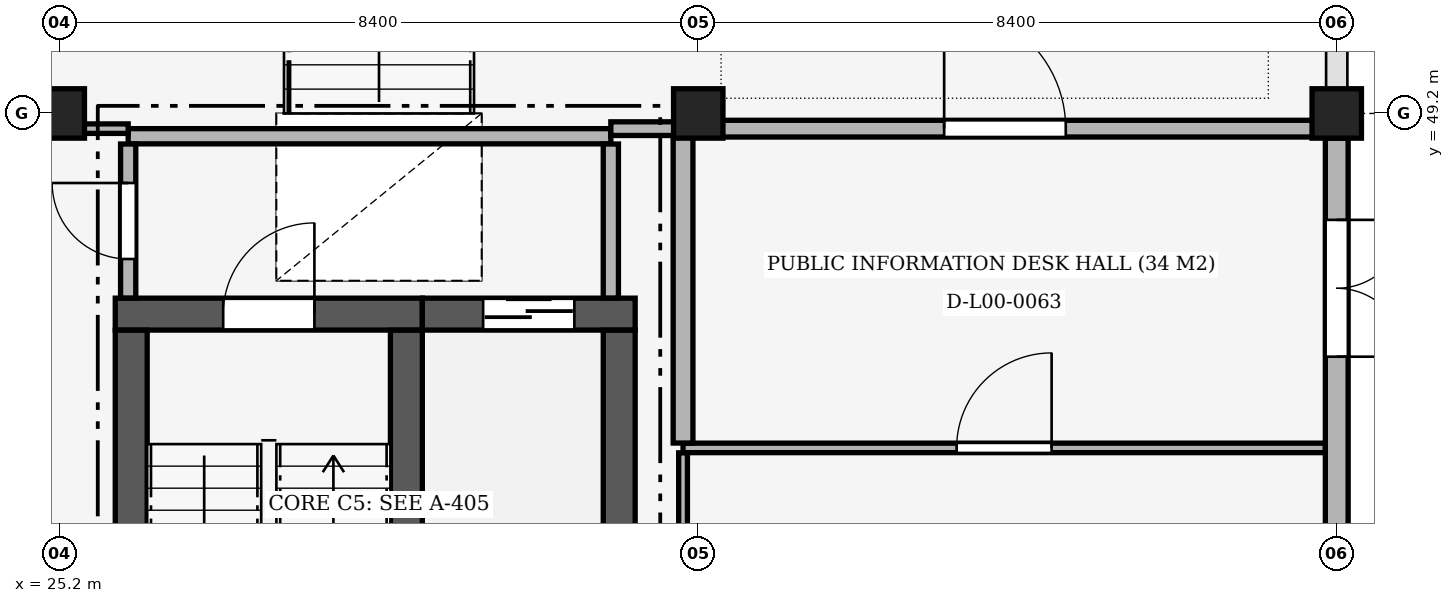
"""IFC4 building model, lengths in metres.
Left out: names, types, materials, properties, quantities, classifications, styles, units other than length and angle.
Written with IfcOpenShell. Run it as: python <this file> out.ifc"""

import sys

from ifc_helpers import new_model, si_unit, direction, frame, frame_2d, origin, origin_2d, place, context, subcontext, project, spatial, rectangle, extrude, element, fill, save


model = new_model("IFC4")
c1 = context("Model", 3, precision=1e-05, world=origin(), true_north=direction((0.0, 1.0)))
c2 = subcontext(c1, "Body", "Model", "MODEL_VIEW")
j1 = project(units=[si_unit("LENGTHUNIT", "METRE"), si_unit("PLANEANGLEUNIT", "RADIAN")], contexts=[c1])
p1 = place(None, origin())
s1 = spatial("IfcSite", under=j1, at=p1, CompositionType="ELEMENT")
p2 = place(p1, origin())
s2 = spatial("IfcBuilding", under=s1, at=p2, CompositionType="ELEMENT")
p3 = place(p2, origin())
s3 = spatial("IfcBuildingStorey", under=s2, at=p3, CompositionType="ELEMENT", Elevation=0.0)
for number, where, z_axis, x_axis in (
    (1, (25.2, 49.2, 0.0), (0.0, 0.0, 1.0), (1.0, 0.0, 0.0)),
    (2, (33.6, 49.2, 0.0), (0.0, 0.0, 1.0), (1.0, 0.0, 0.0)),
    (3, (42.0, 49.2, 0.0), (0.0, 0.0, 1.0), (1.0, 0.0, 0.0)),
):
    element("IfcColumn", number, at=place(p3, frame(where, z_axis=z_axis, x_axis=x_axis)), inside=s3, PredefinedType="COLUMN", context=c2, shape_type="SweptSolid", body=[
        extrude(rectangle(XDim=0.65, YDim=0.65, at=origin_2d()), origin(), (0.0, 0.0, 1.0), 5.1),
    ])
p4 = place(p3, frame((42.0, 48.875, 0.0), z_axis=(0.0, 0.0, 1.0), x_axis=(0.0, -1.0, 0.0)))
e4 = element("IfcWall", 4, at=p4, inside=s3, PredefinedType="SOLIDWALL", context=c2, shape_type="SweptSolid", body=[
    extrude(rectangle(XDim=7.75, YDim=0.3, at=frame_2d((3.875, 0.0))), origin(), (0.0, 0.0, 1.0), 4.22),
])
p5 = place(p4, frame((1.075, 0.0, 0.0)))
e5 = element("IfcOpeningElement", 5, at=p5, cuts=e4, PredefinedType="OPENING", context=c2, shape_type="SweptSolid", body=[
    extrude(rectangle(XDim=1.8, YDim=2.2, at=frame_2d((0.9, 1.1))), frame((0.0, 0.165, 0.0), z_axis=(0.0, -1.0, 0.0), x_axis=(1.0, 0.0, 0.0)), (0.0, 0.0, 1.0), 0.33),
])
p6 = place(p3, frame((25.93, 46.56, 0.0), z_axis=(0.0, 0.0, 1.0), x_axis=(1.0, 0.0, 0.0)))
e6 = element("IfcWall", 6, at=p6, inside=s3, PredefinedType="SHEAR", context=c2, shape_type="SweptSolid", body=[
    extrude(rectangle(XDim=4.04, YDim=0.42, at=frame_2d((2.02, 0.0))), origin(), (0.0, 0.0, 1.0), 4.82),
])
p7 = place(p6, frame((1.42, 0.0, 0.0)))
e7 = element("IfcOpeningElement", 7, at=p7, cuts=e6, PredefinedType="OPENING", context=c2, shape_type="SweptSolid", body=[
    extrude(rectangle(XDim=1.2, YDim=2.2, at=frame_2d((0.6, 1.1))), frame((0.0, 0.225, 0.0), z_axis=(0.0, -1.0, 0.0), x_axis=(1.0, 0.0, 0.0)), (0.0, 0.0, 1.0), 0.45),
])
for number, where, z_axis, x_axis in (
    (8, (26.14, 39.452, 0.0), (0.0, 0.0, 1.0), (0.0, 1.0, 0.0)),
    (9, (29.76, 39.452, 0.0), (0.0, 0.0, 1.0), (0.0, 1.0, 0.0)),
):
    element("IfcWall", number, at=place(p3, frame(where, z_axis=z_axis, x_axis=x_axis)), inside=s3, PredefinedType="SHEAR", context=c2, shape_type="SweptSolid", body=[
        extrude(rectangle(XDim=6.896, YDim=0.42, at=frame_2d((3.448, 0.0))), origin(), (0.0, 0.0, 1.0), 4.82),
    ])
p8 = place(p3, frame((29.97, 46.56, 0.0), z_axis=(0.0, 0.0, 1.0), x_axis=(1.0, 0.0, 0.0)))
e10 = element("IfcWall", 10, at=p8, inside=s3, PredefinedType="SHEAR", context=c2, shape_type="SweptSolid", body=[
    extrude(rectangle(XDim=2.8, YDim=0.42, at=frame_2d((1.4, 0.0))), origin(), (0.0, 0.0, 1.0), 4.82),
])
p9 = place(p8, frame((0.8, 0.0, 0.0)))
e11 = element("IfcOpeningElement", 11, at=p9, cuts=e10, PredefinedType="OPENING", context=c2, shape_type="SweptSolid", body=[
    extrude(rectangle(XDim=1.2, YDim=2.15, at=frame_2d((0.6, 1.075))), frame((0.0, 0.225, 0.0), z_axis=(0.0, -1.0, 0.0), x_axis=(1.0, 0.0, 0.0)), (0.0, 0.0, 1.0), 0.45),
])
p10 = place(p3, frame((32.56, 43.552, 0.0), z_axis=(0.0, 0.0, 1.0), x_axis=(0.0, 1.0, 0.0)))
e12 = element("IfcWall", 12, at=p10, inside=s3, PredefinedType="SHEAR", context=c2, shape_type="SweptSolid", body=[
    extrude(rectangle(XDim=2.796, YDim=0.42, at=frame_2d((1.398, 0.0))), origin(), (0.0, 0.0, 1.0), 4.82),
])
p11 = place(p3, frame((33.4, 44.8, 0.0), z_axis=(0.0, 0.0, 1.0), x_axis=(1.0, 0.0, 0.0)))
e13 = element("IfcWall", 13, at=p11, inside=s3, PredefinedType="PARTITIONING", context=c2, shape_type="SweptSolid", body=[
    extrude(rectangle(XDim=8.448, YDim=0.125, at=frame_2d((4.224, 0.0))), origin(), (0.0, 0.0, 1.0), 4.02),
])
p12 = place(p11, frame((3.599, 0.0, 0.0)))
e14 = element("IfcOpeningElement", 14, at=p12, cuts=e13, PredefinedType="OPENING", context=c2, shape_type="SweptSolid", body=[
    extrude(rectangle(XDim=1.25, YDim=2.2, at=frame_2d((0.625, 1.1))), frame((0.0, 0.077, 0.0), z_axis=(0.0, -1.0, 0.0), x_axis=(1.0, 0.0, 0.0)), (0.0, 0.0, 1.0), 0.155),
])
p13 = place(p3, frame((26.1, 48.9, 0.0), z_axis=(0.0, 0.0, 1.0), x_axis=(1.0, 0.0, 0.0)))
e15 = element("IfcWall", 15, at=p13, inside=s3, PredefinedType="PARTITIONING", context=c2, shape_type="SweptSolid", body=[
    extrude(rectangle(XDim=6.35, YDim=0.2, at=frame_2d((3.175, 0.0))), origin(), (0.0, 0.0, 1.0), 4.07),
])
p14 = place(p3, frame((21.8, 49.0, 0.0), z_axis=(0.0, 0.0, 1.0), x_axis=(1.0, 0.0, 0.0)))
e16 = element("IfcWall", 16, at=p14, inside=s3, PredefinedType="PARTITIONING", context=c2, shape_type="SweptSolid", body=[
    extrude(rectangle(XDim=4.3, YDim=0.125, at=frame_2d((2.15, 0.0))), origin(), (0.0, 0.0, 1.0), 4.02),
])
p15 = place(p3, frame((33.4, 49.0, 0.0), z_axis=(0.0, 0.0, 1.0), x_axis=(1.0, 0.0, 0.0)))
e17 = element("IfcWall", 17, at=p15, inside=s3, PredefinedType="PARTITIONING", context=c2, shape_type="SweptSolid", body=[
    extrude(rectangle(XDim=8.47, YDim=0.22, at=frame_2d((4.235, 0.0))), origin(), (0.0, 0.0, 1.0), 4.02),
])
p16 = place(p15, frame((3.435, 0.0, 0.0)))
e18 = element("IfcOpeningElement", 18, at=p16, cuts=e17, PredefinedType="OPENING", context=c2, shape_type="SweptSolid", body=[
    extrude(rectangle(XDim=1.6, YDim=2.3, at=frame_2d((0.8, 1.15))), frame((0.0, 0.125, 0.0), z_axis=(0.0, -1.0, 0.0), x_axis=(1.0, 0.0, 0.0)), (0.0, 0.0, 1.0), 0.25),
])
p17 = place(p3, frame((32.45, 49.0, 0.0), z_axis=(0.0, 0.0, 1.0), x_axis=(1.0, 0.0, 0.0)))
e19 = element("IfcWall", 19, at=p17, inside=s3, PredefinedType="PARTITIONING", context=c2, shape_type="SweptSolid", body=[
    extrude(rectangle(XDim=0.95, YDim=0.18, at=frame_2d((0.475, 0.0))), origin(), (0.0, 0.0, 1.0), 4.02),
])
p18 = place(p3, frame((26.1, 46.772, 0.0), z_axis=(0.0, 0.0, 1.0), x_axis=(0.0, 1.0, 0.0)))
e20 = element("IfcWall", 20, at=p18, inside=s3, PredefinedType="PARTITIONING", context=c2, shape_type="SweptSolid", body=[
    extrude(rectangle(XDim=2.026, YDim=0.2, at=frame_2d((1.013, 0.0))), origin(), (0.0, 0.0, 1.0), 4.27),
])
p19 = place(p18, frame((0.513, 0.0, 0.0)))
e21 = element("IfcOpeningElement", 21, at=p19, cuts=e20, PredefinedType="OPENING", context=c2, shape_type="SweptSolid", body=[
    extrude(rectangle(XDim=1.0, YDim=2.1, at=frame_2d((0.5, 1.05))), frame((0.0, 0.115, 0.0), z_axis=(0.0, -1.0, 0.0), x_axis=(1.0, 0.0, 0.0)), (0.0, 0.0, 1.0), 0.23),
])
p20 = place(p3, frame((32.45, 46.772, 0.0), z_axis=(0.0, 0.0, 1.0), x_axis=(0.0, 1.0, 0.0)))
e22 = element("IfcWall", 22, at=p20, inside=s3, PredefinedType="PARTITIONING", context=c2, shape_type="SweptSolid", body=[
    extrude(rectangle(XDim=2.026, YDim=0.2, at=frame_2d((1.013, 0.0))), origin(), (0.0, 0.0, 1.0), 4.27),
])
p21 = place(p3, frame((33.4, 39.072, 0.0), z_axis=(0.0, 0.0, 1.0), x_axis=(0.0, 1.0, 0.0)))
e23 = element("IfcWall", 23, at=p21, inside=s3, PredefinedType="PARTITIONING", context=c2, shape_type="SweptSolid", body=[
    extrude(rectangle(XDim=5.663, YDim=0.115, at=frame_2d((2.832, 0.0))), origin(), (0.0, 0.0, 1.0), 4.02),
])
p22 = place(p3, frame((33.4, 44.864, 0.0), z_axis=(0.0, 0.0, 1.0), x_axis=(0.0, 1.0, 0.0)))
e24 = element("IfcWall", 24, at=p22, inside=s3, PredefinedType="PARTITIONING", context=c2, shape_type="SweptSolid", body=[
    extrude(rectangle(XDim=4.024, YDim=0.26, at=frame_2d((2.012, 0.0))), origin(), (0.0, 0.0, 1.0), 4.02),
])
p23 = place(p5, origin())
e25 = element("IfcDoor", 25, at=p23, inside=s3, OperationType="DOUBLE_DOOR_SINGLE_SWING", PredefinedType="DOOR", context=c2, shape_type="SweptSolid", body=[
    extrude(rectangle(XDim=1.8, YDim=2.2, at=frame_2d((0.9, 1.1))), frame((0.0, 0.025, 0.0), z_axis=(0.0, -1.0, 0.0), x_axis=(1.0, 0.0, 0.0)), (0.0, 0.0, 1.0), 0.05),
])
fill(e5, e25)
p24 = place(p7, origin())
e26 = element("IfcDoor", 26, at=p24, inside=s3, OperationType="SINGLE_SWING_RIGHT", PredefinedType="DOOR", context=c2, shape_type="SweptSolid", body=[
    extrude(rectangle(XDim=1.2, YDim=2.2, at=frame_2d((0.6, 1.1))), frame((0.0, 0.025, 0.0), z_axis=(0.0, -1.0, 0.0), x_axis=(1.0, 0.0, 0.0)), (0.0, 0.0, 1.0), 0.05),
])
fill(e7, e26)
p25 = place(p9, origin())
e27 = element("IfcDoor", 27, at=p25, inside=s3, OperationType="DOUBLE_DOOR_SLIDING", PredefinedType="DOOR", context=c2, shape_type="SweptSolid", body=[
    extrude(rectangle(XDim=1.2, YDim=2.15, at=frame_2d((0.6, 1.075))), frame((0.0, 0.025, 0.0), z_axis=(0.0, -1.0, 0.0), x_axis=(1.0, 0.0, 0.0)), (0.0, 0.0, 1.0), 0.05),
])
fill(e11, e27)
p26 = place(p19, origin())
e28 = element("IfcDoor", 28, at=p26, inside=s3, OperationType="SINGLE_SWING_RIGHT", PredefinedType="DOOR", context=c2, shape_type="SweptSolid", body=[
    extrude(rectangle(XDim=1.0, YDim=2.1, at=frame_2d((0.5, 1.05))), frame((0.0, 0.025, 0.0), z_axis=(0.0, -1.0, 0.0), x_axis=(1.0, 0.0, 0.0)), (0.0, 0.0, 1.0), 0.05),
])
fill(e21, e28)
p27 = place(p12, origin())
e29 = element("IfcDoor", 29, at=p27, inside=s3, OperationType="SINGLE_SWING_RIGHT", PredefinedType="DOOR", context=c2, shape_type="SweptSolid", body=[
    extrude(rectangle(XDim=1.25, YDim=2.2, at=frame_2d((0.625, 1.1))), frame((0.0, 0.025, 0.0), z_axis=(0.0, -1.0, 0.0), x_axis=(1.0, 0.0, 0.0)), (0.0, 0.0, 1.0), 0.05),
])
fill(e14, e29)
p28 = place(p16, origin())
e30 = element("IfcDoor", 30, at=p28, inside=s3, OperationType="SINGLE_SWING_LEFT", PredefinedType="DOOR", context=c2, shape_type="SweptSolid", body=[
    extrude(rectangle(XDim=1.6, YDim=2.3, at=frame_2d((0.8, 1.15))), frame((0.0, 0.025, 0.0), z_axis=(0.0, -1.0, 0.0), x_axis=(1.0, 0.0, 0.0)), (0.0, 0.0, 1.0), 0.05),
])
fill(e18, e30)
save(model, sys.argv[1])
